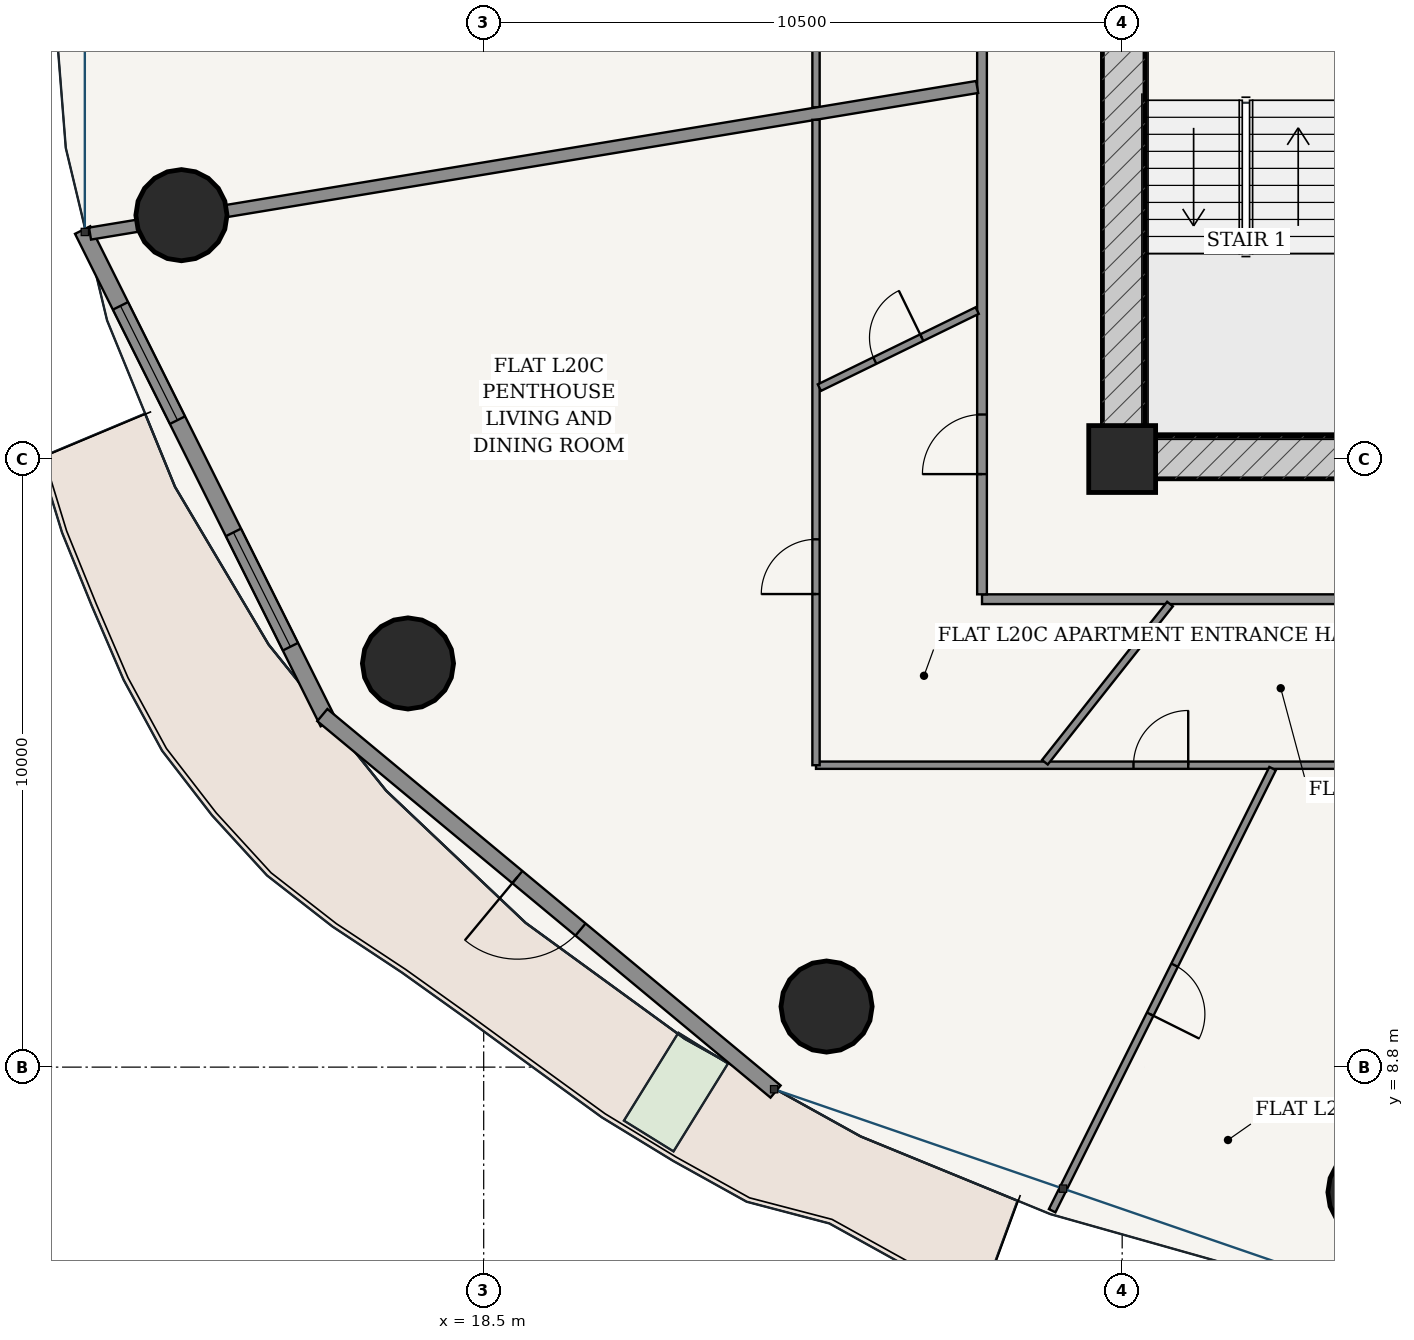
"""IFC4 building model, lengths in metres.
Left out: names, types, materials, properties, quantities, classifications, styles, units other than length and angle.
Written with IfcOpenShell. Run it as: python <this file> out.ifc"""

import sys

from ifc_helpers import new_model, si_unit, direction, frame, frame_2d, origin, origin_2d, place, context, subcontext, project, spatial, rectangle, hollow_circle, extrude, source, transform, mapped, element, fill, save


model = new_model("IFC4")
c1 = context("Model", 3, precision=1e-05, world=origin(), true_north=direction((-0.2419218956, 0.970295726276)))
c2 = subcontext(c1, "Body", "Model", "MODEL_VIEW")
j1 = project(units=[si_unit("LENGTHUNIT", "METRE"), si_unit("PLANEANGLEUNIT", "RADIAN")], contexts=[c1])
p1 = place(None, origin())
s1 = spatial("IfcSite", under=j1, at=p1, CompositionType="ELEMENT")
p2 = place(p1, origin())
s2 = spatial("IfcBuilding", under=s1, at=p2, CompositionType="ELEMENT")
p3 = place(p2, frame((0.0, 0.0, 79.8)))
s3 = spatial("IfcBuildingStorey", under=s2, at=p3, CompositionType="ELEMENT", Elevation=79.8)
p4 = place(p3, frame((29.0, 18.8, 0.0), z_axis=(0.0, 0.0, 1.0), x_axis=(1.0, 0.0, 0.0)))
e1 = element("IfcColumn", 1, at=p4, inside=s3, PredefinedType="COLUMN", context=c2, shape_type="SweptSolid", body=[
    extrude(rectangle(XDim=1.1, YDim=1.1, at=origin_2d()), origin(), (0.0, 0.0, 1.0), 3.6),
])
p5 = place(p3, frame((28.675, 18.825, 0.0), z_axis=(0.0, 0.0, 1.0), x_axis=(1.0, 0.0, 0.0)))
e2 = element("IfcWall", 2, at=p5, inside=s3, PredefinedType="SHEAR", context=c2, shape_type="SweptSolid", body=[
    extrude(rectangle(XDim=18.65, YDim=0.7, at=frame_2d((9.325, 0.0))), origin(), (0.0, 0.0, 1.0), 3.325),
])
p6 = place(p5, frame((7.577, 0.0, 0.0)))
e3 = element("IfcOpeningElement", 3, at=p6, cuts=e2, PredefinedType="OPENING", context=c2, shape_type="SweptSolid", body=[
    extrude(rectangle(XDim=0.85, YDim=2.1, at=frame_2d((0.425, 1.05))), frame((0.0, 0.36, 0.0), z_axis=(0.0, -1.0, 0.0), x_axis=(1.0, 0.0, 0.0)), (0.0, 0.0, 1.0), 0.72),
])
p7 = place(p5, frame((10.623, 0.0, 0.0)))
e4 = element("IfcOpeningElement", 4, at=p7, cuts=e2, PredefinedType="OPENING", context=c2, shape_type="SweptSolid", body=[
    extrude(rectangle(XDim=0.85, YDim=2.1, at=frame_2d((0.425, 1.05))), frame((0.0, 0.36, 0.0), z_axis=(0.0, -1.0, 0.0), x_axis=(1.0, 0.0, 0.0)), (0.0, 0.0, 1.0), 0.72),
])
p8 = place(p3, frame((29.025, 19.175, 0.0), z_axis=(0.0, 0.0, 1.0), x_axis=(0.0, 1.0, 0.0)))
e5 = element("IfcWall", 5, at=p8, inside=s3, PredefinedType="SHEAR", context=c2, shape_type="SweptSolid", body=[
    extrude(rectangle(XDim=15.25, YDim=0.7, at=frame_2d((7.625, 0.0))), origin(), (0.0, 0.0, 1.0), 3.325),
])
p9 = place(p8, frame((9.875, 0.0, 0.0)))
e6 = element("IfcOpeningElement", 6, at=p9, cuts=e5, PredefinedType="OPENING", context=c2, shape_type="SweptSolid", body=[
    extrude(rectangle(XDim=1.5, YDim=2.2, at=frame_2d((0.75, 1.1))), frame((0.0, 0.36, 0.0), z_axis=(0.0, -1.0, 0.0), x_axis=(1.0, 0.0, 0.0)), (0.0, 0.0, 1.0), 0.72),
])
for number, where, z_axis, x_axis in (
    (7, (13.529, 22.81, 0.0), (0.0, 0.0, 1.0), (1.0, 0.0, 0.0)),
    (8, (17.255, 15.438, 0.0), (0.0, 0.0, 1.0), (1.0, 0.0, 0.0)),
    (9, (24.138, 9.796, 0.0), (0.0, 0.0, 1.0), (1.0, 0.0, 0.0)),
    (10, (33.133, 6.743, 0.0), (0.0, 0.0, 1.0), (1.0, 0.0, 0.0)),
):
    element("IfcColumn", number, at=place(p3, frame(where, z_axis=z_axis, x_axis=x_axis)), inside=s3, PredefinedType="COLUMN", context=c2, shape_type="SweptSolid", body=[
        extrude(hollow_circle(Radius=0.75, WallThickness=0.045, at=origin_2d()), origin(), (0.0, 0.0, 1.0), 3.6),
    ])
p10 = place(p3, frame((11.905, 22.566, 0.0), z_axis=(0.0, 0.0, 1.0), x_axis=(0.446274562077, -0.894896091869, 0.0)))
e11 = element("IfcWall", 11, at=p10, inside=s3, PredefinedType="SOLIDWALL", context=c2, shape_type="SweptSolid", body=[
    extrude(rectangle(XDim=9.05, YDim=0.28, at=frame_2d((4.525, 0.0))), origin(), (0.0, 0.0, 1.0), 3.325),
])
p11 = place(p10, frame((1.394, 0.0, 0.85)))
e12 = element("IfcOpeningElement", 12, at=p11, cuts=e11, PredefinedType="OPENING", context=c2, shape_type="SweptSolid", body=[
    extrude(rectangle(XDim=2.1, YDim=1.95, at=frame_2d((1.05, 0.975))), frame((0.0, 0.15, 0.0), z_axis=(0.0, -1.0, 0.0), x_axis=(1.0, 0.0, 0.0)), (0.0, 0.0, 1.0), 0.3),
])
p12 = place(p10, frame((5.557, 0.0, 0.85)))
e13 = element("IfcOpeningElement", 13, at=p12, cuts=e11, PredefinedType="OPENING", context=c2, shape_type="SweptSolid", body=[
    extrude(rectangle(XDim=2.1, YDim=1.95, at=frame_2d((1.05, 0.975))), frame((0.0, 0.15, 0.0), z_axis=(0.0, -1.0, 0.0), x_axis=(1.0, 0.0, 0.0)), (0.0, 0.0, 1.0), 0.3),
])
p13 = place(p3, frame((15.846, 14.59, 0.0), z_axis=(0.0, 0.0, 1.0), x_axis=(0.769254958887, -0.638941944333, 0.0)))
e14 = element("IfcWall", 14, at=p13, inside=s3, PredefinedType="SOLIDWALL", context=c2, shape_type="SweptSolid", body=[
    extrude(rectangle(XDim=9.69, YDim=0.26, at=frame_2d((4.845, 0.0))), origin(), (0.0, 0.0, 1.0), 3.325),
])
p14 = place(p13, frame((4.17, 0.0, 0.0)))
e15 = element("IfcOpeningElement", 15, at=p14, cuts=e14, PredefinedType="OPENING", context=c2, shape_type="SweptSolid", body=[
    extrude(rectangle(XDim=1.35, YDim=2.2, at=frame_2d((0.675, 1.1))), frame((0.0, 0.14, 0.0), z_axis=(0.0, -1.0, 0.0), x_axis=(1.0, 0.0, 0.0)), (0.0, 0.0, 1.0), 0.28),
])
p15 = place(p3, frame((26.695, 16.495, 0.0), z_axis=(0.0, 0.0, 1.0), x_axis=(1.0, 0.0, 0.0)))
e16 = element("IfcWall", 16, at=p15, inside=s3, PredefinedType="PARTITIONING", context=c2, shape_type="SweptSolid", body=[
    extrude(rectangle(XDim=22.61, YDim=0.16, at=frame_2d((11.305, 0.0))), origin(), (0.0, 0.0, 1.0), 2.767),
])
p16 = place(p3, frame((26.695, 16.575, 0.0), z_axis=(0.0, 0.0, 1.0), x_axis=(0.0, 1.0, 0.0)))
e17 = element("IfcWall", 17, at=p16, inside=s3, PredefinedType="PARTITIONING", context=c2, shape_type="SweptSolid", body=[
    extrude(rectangle(XDim=20.45, YDim=0.16, at=frame_2d((10.225, 0.0))), origin(), (0.0, 0.0, 1.0), 2.767),
])
p17 = place(p16, frame((1.977, 0.0, 0.0)))
e18 = element("IfcOpeningElement", 18, at=p17, cuts=e17, PredefinedType="OPENING", context=c2, shape_type="SweptSolid", body=[
    extrude(rectangle(XDim=0.98, YDim=2.2, at=frame_2d((0.49, 1.1))), frame((0.0, 0.09, 0.0), z_axis=(0.0, -1.0, 0.0), x_axis=(1.0, 0.0, 0.0)), (0.0, 0.0, 1.0), 0.18),
])
p18 = place(p3, frame((23.965, 24.583, 0.0), z_axis=(0.0, 0.0, 1.0), x_axis=(0.0, 1.0, 0.0)))
e19 = element("IfcWall", 19, at=p18, inside=s3, PredefinedType="PARTITIONING", context=c2, shape_type="SweptSolid", body=[
    extrude(rectangle(XDim=15.252, YDim=0.12, at=frame_2d((7.626, 0.0))), origin(), (0.0, 0.0, 1.0), 2.767),
])
p19 = place(p3, frame((26.615, 24.918, 0.0), z_axis=(0.0, 0.0, 1.0), x_axis=(-0.986618789677, -0.163044054958, 0.0)))
e20 = element("IfcWall", 20, at=p19, inside=s3, PredefinedType="PARTITIONING", context=c2, shape_type="SweptSolid", body=[
    extrude(rectangle(XDim=14.787, YDim=0.2, at=frame_2d((7.393, 0.0))), origin(), (0.0, 0.0, 1.0), 2.767),
])
p20 = place(p3, frame((41.019, 13.765, 0.0), z_axis=(0.0, 0.0, 1.0), x_axis=(-1.0, 0.0, 0.0)))
e21 = element("IfcWall", 21, at=p20, inside=s3, PredefinedType="PARTITIONING", context=c2, shape_type="SweptSolid", body=[
    extrude(rectangle(XDim=17.054, YDim=0.12, at=frame_2d((8.527, 0.0))), origin(), (0.0, 0.0, 1.0), 2.767),
])
p21 = place(p20, frame((10.933, 0.0, 0.0)))
e22 = element("IfcOpeningElement", 22, at=p21, cuts=e21, PredefinedType="OPENING", context=c2, shape_type="SweptSolid", body=[
    extrude(rectangle(XDim=0.9, YDim=2.15, at=frame_2d((0.45, 1.075))), frame((0.0, 0.07, 0.0), z_axis=(0.0, -1.0, 0.0), x_axis=(1.0, 0.0, 0.0)), (0.0, 0.0, 1.0), 0.14),
])
p22 = place(p3, frame((23.965, 13.765, 0.0), z_axis=(0.0, 0.0, 1.0), x_axis=(0.0, 1.0, 0.0)))
e23 = element("IfcWall", 23, at=p22, inside=s3, PredefinedType="PARTITIONING", context=c2, shape_type="SweptSolid", body=[
    extrude(rectangle(XDim=10.614, YDim=0.12, at=frame_2d((5.307, 0.0))), origin(), (0.0, 0.0, 1.0), 2.767),
])
p23 = place(p22, frame((2.815, 0.0, 0.0)))
e24 = element("IfcOpeningElement", 24, at=p23, cuts=e23, PredefinedType="OPENING", context=c2, shape_type="SweptSolid", body=[
    extrude(rectangle(XDim=0.9, YDim=2.15, at=frame_2d((0.45, 1.075))), frame((0.0, 0.07, 0.0), z_axis=(0.0, -1.0, 0.0), x_axis=(1.0, 0.0, 0.0)), (0.0, 0.0, 1.0), 0.14),
])
p24 = place(p3, frame((31.474, 13.709, 0.0), z_axis=(0.0, 0.0, 1.0), x_axis=(-0.446179583353, -0.894943450392, 0.0)))
e25 = element("IfcWall", 25, at=p24, inside=s3, PredefinedType="PARTITIONING", context=c2, shape_type="SweptSolid", body=[
    extrude(rectangle(XDim=8.125, YDim=0.12, at=frame_2d((4.062, 0.0))), origin(), (0.0, 0.0, 1.0), 2.767),
])
p25 = place(p24, frame((3.612, 0.0, 0.0)))
e26 = element("IfcOpeningElement", 26, at=p25, cuts=e25, PredefinedType="OPENING", context=c2, shape_type="SweptSolid", body=[
    extrude(rectangle(XDim=0.9, YDim=2.15, at=frame_2d((0.45, 1.075))), frame((0.0, 0.07, 0.0), z_axis=(0.0, -1.0, 0.0), x_axis=(1.0, 0.0, 0.0)), (0.0, 0.0, 1.0), 0.14),
])
p26 = place(p3, frame((26.615, 21.241, 0.0), z_axis=(0.0, 0.0, 1.0), x_axis=(-0.898615592274, -0.438736842906, 0.0)))
e27 = element("IfcWall", 27, at=p26, inside=s3, PredefinedType="PARTITIONING", context=c2, shape_type="SweptSolid", body=[
    extrude(rectangle(XDim=2.887, YDim=0.12, at=frame_2d((1.443, 0.0))), origin(), (0.0, 0.0, 1.0), 3.325),
])
p27 = place(p26, frame((1.013, 0.0, 0.0)))
e28 = element("IfcOpeningElement", 28, at=p27, cuts=e27, PredefinedType="OPENING", context=c2, shape_type="SweptSolid", body=[
    extrude(rectangle(XDim=0.86, YDim=2.15, at=frame_2d((0.43, 1.075))), frame((0.0, 0.07, 0.0), z_axis=(0.0, -1.0, 0.0), x_axis=(1.0, 0.0, 0.0)), (0.0, 0.0, 1.0), 0.14),
])
p28 = place(p3, frame((29.787, 16.415, 0.0), z_axis=(0.0, 0.0, 1.0), x_axis=(-0.62033143471, -0.784339793145, 0.0)))
e29 = element("IfcWall", 29, at=p28, inside=s3, PredefinedType="PARTITIONING", context=c2, shape_type="SweptSolid", body=[
    extrude(rectangle(XDim=3.317, YDim=0.12, at=frame_2d((1.658, 0.0))), origin(), (0.0, 0.0, 1.0), 3.004),
])
m1 = source(origin(), c2, "Body", "SweptSolid", [
    extrude(rectangle(XDim=2.1, YDim=1.95, at=frame_2d((1.05, 0.975))), frame((0.0, 0.03, 0.0), z_axis=(0.0, -1.0, 0.0), x_axis=(1.0, 0.0, 0.0)), (0.0, 0.0, 1.0), 0.06),
])
p29 = place(p11, origin())
e30 = element("IfcWindow", 30, at=p29, inside=s3, PartitioningType="SINGLE_PANEL", PredefinedType="WINDOW", context=c2, shape_type="MappedRepresentation", body=[
    mapped(m1, transform((0.0, 0.0, 0.0), scale=1.0)),
])
fill(e12, e30)
p30 = place(p12, origin())
e31 = element("IfcWindow", 31, at=p30, inside=s3, PartitioningType="SINGLE_PANEL", PredefinedType="WINDOW", context=c2, shape_type="MappedRepresentation", body=[
    mapped(m1, transform((0.0, 0.0, 0.0), scale=1.0)),
])
fill(e13, e31)
m2 = source(origin(), c2, "Body", "SweptSolid", [
    extrude(rectangle(XDim=1.35, YDim=2.2, at=frame_2d((0.675, 1.1))), frame((0.0, 0.025, 0.0), z_axis=(0.0, -1.0, 0.0), x_axis=(1.0, 0.0, 0.0)), (0.0, 0.0, 1.0), 0.05),
])
p31 = place(p14, frame((1.35, 0.0, 0.0), z_axis=(0.0, 0.0, 1.0), x_axis=(-1.0, 0.0, 0.0)))
e32 = element("IfcDoor", 32, at=p31, inside=s3, OperationType="SINGLE_SWING_RIGHT", PredefinedType="DOOR", context=c2, shape_type="MappedRepresentation", body=[
    mapped(m2, transform((0.0, 0.0, 0.0), scale=1.0)),
])
fill(e15, e32)
m3 = source(origin(), c2, "Body", "SweptSolid", [
    extrude(rectangle(XDim=0.98, YDim=2.2, at=frame_2d((0.49, 1.1))), frame((0.0, 0.025, 0.0), z_axis=(0.0, -1.0, 0.0), x_axis=(1.0, 0.0, 0.0)), (0.0, 0.0, 1.0), 0.05),
])
p32 = place(p17, origin())
e33 = element("IfcDoor", 33, at=p32, inside=s3, OperationType="SINGLE_SWING_LEFT", PredefinedType="DOOR", context=c2, shape_type="MappedRepresentation", body=[
    mapped(m3, transform((0.0, 0.0, 0.0), scale=1.0)),
])
fill(e18, e33)
m4 = source(origin(), c2, "Body", "SweptSolid", [
    extrude(rectangle(XDim=0.86, YDim=2.15, at=frame_2d((0.43, 1.075))), frame((0.0, 0.025, 0.0), z_axis=(0.0, -1.0, 0.0), x_axis=(1.0, 0.0, 0.0)), (0.0, 0.0, 1.0), 0.05),
])
p33 = place(p27, frame((0.86, 0.0, 0.0), z_axis=(0.0, 0.0, 1.0), x_axis=(-1.0, 0.0, 0.0)))
e34 = element("IfcDoor", 34, at=p33, inside=s3, OperationType="SINGLE_SWING_RIGHT", PredefinedType="DOOR", context=c2, shape_type="MappedRepresentation", body=[
    mapped(m4, transform((0.0, 0.0, 0.0), scale=1.0)),
])
fill(e28, e34)
m5 = source(origin(), c2, "Body", "SweptSolid", [
    extrude(rectangle(XDim=0.9, YDim=2.15, at=frame_2d((0.45, 1.075))), frame((0.0, 0.025, 0.0), z_axis=(0.0, -1.0, 0.0), x_axis=(1.0, 0.0, 0.0)), (0.0, 0.0, 1.0), 0.05),
])
p34 = place(p23, origin())
e35 = element("IfcDoor", 35, at=p34, inside=s3, OperationType="SINGLE_SWING_LEFT", PredefinedType="DOOR", context=c2, shape_type="MappedRepresentation", body=[
    mapped(m5, transform((0.0, 0.0, 0.0), scale=1.0)),
])
fill(e24, e35)
p35 = place(p21, frame((0.9, 0.0, 0.0), z_axis=(0.0, 0.0, 1.0), x_axis=(-1.0, 0.0, 0.0)))
e36 = element("IfcDoor", 36, at=p35, inside=s3, OperationType="SINGLE_SWING_RIGHT", PredefinedType="DOOR", context=c2, shape_type="MappedRepresentation", body=[
    mapped(m5, transform((0.0, 0.0, 0.0), scale=1.0)),
])
fill(e22, e36)
p36 = place(p25, origin())
e37 = element("IfcDoor", 37, at=p36, inside=s3, OperationType="SINGLE_SWING_RIGHT", PredefinedType="DOOR", context=c2, shape_type="MappedRepresentation", body=[
    mapped(m5, transform((0.0, 0.0, 0.0), scale=1.0)),
])
fill(e26, e37)
save(model, sys.argv[1])
